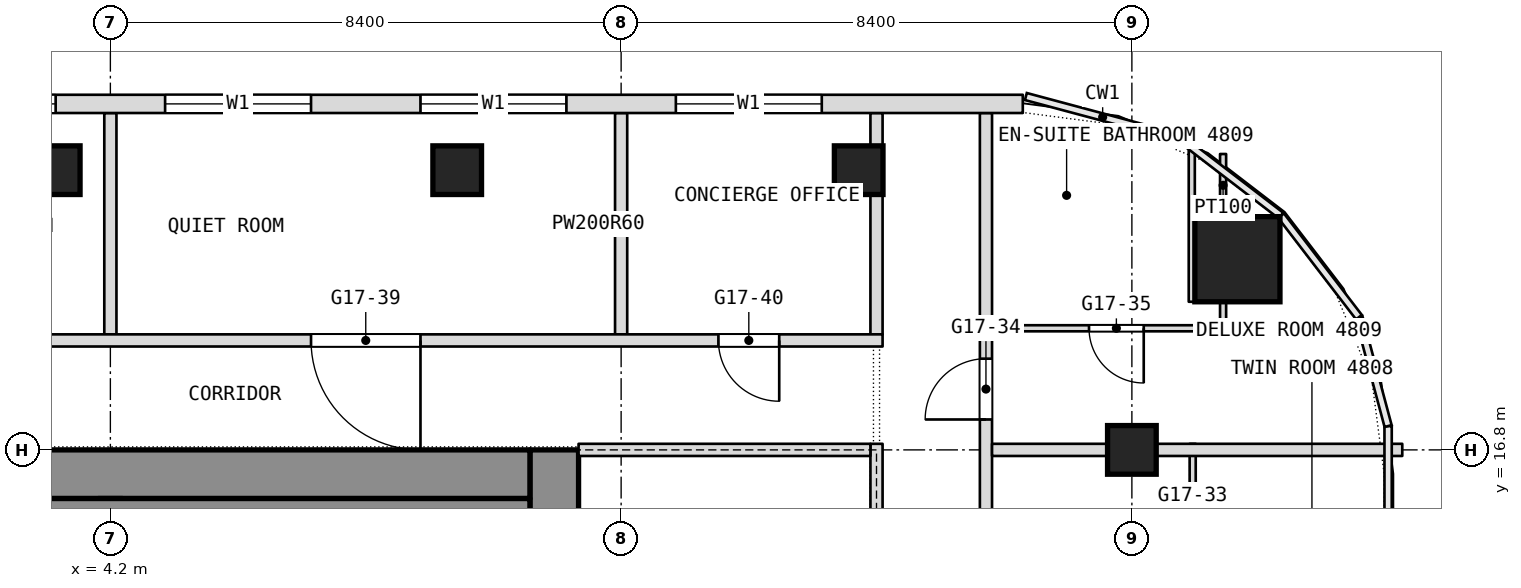
"""IFC4 building model, lengths in metres.
Left out: names, types, materials, properties, quantities, classifications, styles, units other than length and angle.
Written with IfcOpenShell. Run it as: python <this file> out.ifc"""

import sys

from ifc_helpers import new_model, si_unit, direction, frame, frame_2d, origin, origin_2d, place, context, subcontext, project, spatial, rectangle, extrude, element, fill, save


model = new_model("IFC4")
c1 = context("Model", 3, precision=1e-05, world=origin(), true_north=direction((0.0, 1.0)))
c2 = subcontext(c1, "Body", "Model", "MODEL_VIEW")
j1 = project(units=[si_unit("LENGTHUNIT", "METRE"), si_unit("PLANEANGLEUNIT", "RADIAN")], contexts=[c1])
p1 = place(None, origin())
s1 = spatial("IfcSite", under=j1, at=p1, CompositionType="ELEMENT")
p2 = place(p1, origin())
s2 = spatial("IfcBuilding", under=s1, at=p2, CompositionType="ELEMENT")
p3 = place(p2, frame((0.0, 0.0, 209.3)))
s3 = spatial("IfcBuildingStorey", under=s2, at=p3, CompositionType="ELEMENT", Elevation=209.3)
p4 = place(p3, frame((11.5, 0.0, 0.0), z_axis=(0.0, 0.0, 1.0), x_axis=(0.0, 1.0, 0.0)))
e1 = element("IfcWall", 1, at=p4, inside=s3, PredefinedType="SHEAR", context=c2, shape_type="SweptSolid", body=[
    extrude(rectangle(XDim=16.8, YDim=0.8, at=frame_2d((8.4, 0.0))), origin(), (0.0, 0.0, 1.0), 3.6),
])
p5 = place(p4, frame((2.3, 0.0, 0.0)))
e2 = element("IfcOpeningElement", 2, at=p5, cuts=e1, PredefinedType="OPENING", context=c2, shape_type="SweptSolid", body=[
    extrude(rectangle(XDim=1.1, YDim=2.1, at=frame_2d((0.55, 1.05))), frame((0.0, 0.4, 0.0), z_axis=(0.0, -1.0, 0.0), x_axis=(1.0, 0.0, 0.0)), (0.0, 0.0, 1.0), 0.8),
])
p6 = place(p4, frame((4.85, 0.0, 0.0)))
e3 = element("IfcOpeningElement", 3, at=p6, cuts=e1, PredefinedType="OPENING", context=c2, shape_type="SweptSolid", body=[
    extrude(rectangle(XDim=1.1, YDim=2.1, at=frame_2d((0.55, 1.05))), frame((0.0, 0.4, 0.0), z_axis=(0.0, -1.0, 0.0), x_axis=(1.0, 0.0, 0.0)), (0.0, 0.0, 1.0), 0.8),
])
p7 = place(p4, frame((6.825, 0.0, 0.0)))
e4 = element("IfcOpeningElement", 4, at=p7, cuts=e1, PredefinedType="OPENING", context=c2, shape_type="SweptSolid", body=[
    extrude(rectangle(XDim=1.2, YDim=2.1, at=frame_2d((0.6, 1.05))), frame((0.0, 0.4, 0.0), z_axis=(0.0, -1.0, 0.0), x_axis=(1.0, 0.0, 0.0)), (0.0, 0.0, 1.0), 0.8),
])
p8 = place(p4, frame((13.4, 0.0, 0.0)))
e5 = element("IfcOpeningElement", 5, at=p8, cuts=e1, PredefinedType="OPENING", context=c2, shape_type="SweptSolid", body=[
    extrude(rectangle(XDim=1.1, YDim=2.1, at=frame_2d((0.55, 1.05))), frame((0.0, 0.4, 0.0), z_axis=(0.0, -1.0, 0.0), x_axis=(1.0, 0.0, 0.0)), (0.0, 0.0, 1.0), 0.8),
])
p9 = place(p4, frame((10.85, 0.0, 0.0)))
e6 = element("IfcOpeningElement", 6, at=p9, cuts=e1, PredefinedType="OPENING", context=c2, shape_type="SweptSolid", body=[
    extrude(rectangle(XDim=1.1, YDim=2.1, at=frame_2d((0.55, 1.05))), frame((0.0, 0.4, 0.0), z_axis=(0.0, -1.0, 0.0), x_axis=(1.0, 0.0, 0.0)), (0.0, 0.0, 1.0), 0.8),
])
p10 = place(p4, frame((8.775, 0.0, 0.0)))
e7 = element("IfcOpeningElement", 7, at=p10, cuts=e1, PredefinedType="OPENING", context=c2, shape_type="SweptSolid", body=[
    extrude(rectangle(XDim=1.2, YDim=2.1, at=frame_2d((0.6, 1.05))), frame((0.0, 0.4, 0.0), z_axis=(0.0, -1.0, 0.0), x_axis=(1.0, 0.0, 0.0)), (0.0, 0.0, 1.0), 0.8),
])
p11 = place(p3, frame((-11.1, 16.4, 0.0), z_axis=(0.0, 0.0, 1.0), x_axis=(1.0, 0.0, 0.0)))
e8 = element("IfcWall", 8, at=p11, inside=s3, PredefinedType="SHEAR", context=c2, shape_type="SweptSolid", body=[
    extrude(rectangle(XDim=22.2, YDim=0.8, at=frame_2d((11.1, 0.0))), origin(), (0.0, 0.0, 1.0), 3.6),
])
p12 = place(p3, frame((4.2, 0.8, 0.0), z_axis=(0.0, 0.0, 1.0), x_axis=(0.0, 1.0, 0.0)))
e9 = element("IfcWall", 9, at=p12, inside=s3, PredefinedType="SHEAR", context=c2, shape_type="SweptSolid", body=[
    extrude(rectangle(XDim=15.2, YDim=0.4, at=frame_2d((7.6, 0.0))), origin(), (0.0, 0.0, 1.0), 3.6),
])
p13 = place(p12, frame((5.95, 0.0, 0.0)))
e10 = element("IfcOpeningElement", 10, at=p13, cuts=e9, PredefinedType="OPENING", context=c2, shape_type="SweptSolid", body=[
    extrude(rectangle(XDim=1.2, YDim=2.1, at=frame_2d((0.6, 1.05))), frame((0.0, 0.2, 0.0), z_axis=(0.0, -1.0, 0.0), x_axis=(1.0, 0.0, 0.0)), (0.0, 0.0, 1.0), 0.4),
])
p14 = place(p3, frame((22.736, 19.936, 0.0), z_axis=(0.0, 0.0, 1.0), x_axis=(1.0, 0.0, 0.0)))
e11 = element("IfcColumn", 11, at=p14, inside=s3, PredefinedType="COLUMN", context=c2, shape_type="SweptSolid", body=[
    extrude(rectangle(XDim=1.4, YDim=1.4, at=origin_2d()), origin(), (0.0, 0.0, 1.0), 3.6),
])
for number, where, z_axis, x_axis in (
    (12, (21.0, 16.8, 0.0), (0.0, 0.0, 1.0), (1.0, 0.0, 0.0)),
    (13, (3.302, 21.4, 0.0), (0.0, 0.0, 1.0), (1.0, 0.0, 0.0)),
    (14, (9.904, 21.4, 0.0), (0.0, 0.0, 1.0), (1.0, 0.0, 0.0)),
    (15, (16.507, 21.4, 0.0), (0.0, 0.0, 1.0), (1.0, 0.0, 0.0)),
):
    element("IfcColumn", number, at=place(p3, frame(where, z_axis=z_axis, x_axis=x_axis)), inside=s3, PredefinedType="COLUMN", context=c2, shape_type="SweptSolid", body=[
        extrude(rectangle(XDim=0.8, YDim=0.8, at=origin_2d()), origin(), (0.0, 0.0, 1.0), 3.6),
    ])
p15 = place(p3, frame((22.5, 18.85, 0.0), z_axis=(0.0, 0.0, 1.0), x_axis=(0.0, 1.0, 0.0)))
e16 = element("IfcWall", 16, at=p15, inside=s3, PredefinedType="PARTITIONING", context=c2, shape_type="SweptSolid", body=[
    extrude(rectangle(XDim=0.386, YDim=0.1, at=frame_2d((0.193, 0.0))), origin(), (0.0, 0.0, 1.0), 3.34),
])
p16 = place(p3, frame((22.5, 20.636, 0.0), z_axis=(0.0, 0.0, 1.0), x_axis=(0.0, 1.0, 0.0)))
e17 = element("IfcWall", 17, at=p16, inside=s3, PredefinedType="PARTITIONING", context=c2, shape_type="SweptSolid", body=[
    extrude(rectangle(XDim=1.03, YDim=0.1, at=frame_2d((0.515, 0.0))), origin(), (0.0, 0.0, 1.0), 3.34),
])
p17 = place(p3, frame((22.0, 14.45, 0.0), z_axis=(0.0, 0.0, 1.0), x_axis=(0.0, 1.0, 0.0)))
e18 = element("IfcWall", 18, at=p17, inside=s3, PredefinedType="PARTITIONING", context=c2, shape_type="SweptSolid", body=[
    extrude(rectangle(XDim=2.45, YDim=0.1, at=frame_2d((1.225, 0.0))), origin(), (0.0, 0.0, 1.0), 3.34),
])
p18 = place(p17, frame((0.15, 0.0, 0.0)))
e19 = element("IfcOpeningElement", 19, at=p18, cuts=e18, PredefinedType="OPENING", context=c2, shape_type="SweptSolid", body=[
    extrude(rectangle(XDim=0.9, YDim=2.1, at=frame_2d((0.45, 1.05))), frame((0.0, 0.05, 0.0), z_axis=(0.0, -1.0, 0.0), x_axis=(1.0, 0.0, 0.0)), (0.0, 0.0, 1.0), 0.1),
])
p19 = place(p3, frame((18.6, -26.751, 0.0), z_axis=(0.0, 0.0, 1.0), x_axis=(0.0, 1.0, 0.0)))
e20 = element("IfcWall", 20, at=p19, inside=s3, PredefinedType="PARTITIONING", context=c2, shape_type="SweptSolid", body=[
    extrude(rectangle(XDim=49.091, YDim=0.2, at=frame_2d((24.545, 0.0))), origin(), (0.0, 0.0, 1.0), 3.34),
])
p20 = place(p19, frame((3.413, 0.0, 0.0)))
e21 = element("IfcOpeningElement", 21, at=p20, cuts=e20, PredefinedType="OPENING", context=c2, shape_type="SweptSolid", body=[
    extrude(rectangle(XDim=1.0, YDim=2.1, at=frame_2d((0.5, 1.05))), frame((0.0, 0.1, 0.0), z_axis=(0.0, -1.0, 0.0), x_axis=(1.0, 0.0, 0.0)), (0.0, 0.0, 1.0), 0.2),
])
p21 = place(p19, frame((5.838, 0.0, 0.0)))
e22 = element("IfcOpeningElement", 22, at=p21, cuts=e20, PredefinedType="OPENING", context=c2, shape_type="SweptSolid", body=[
    extrude(rectangle(XDim=1.0, YDim=2.1, at=frame_2d((0.5, 1.05))), frame((0.0, 0.1, 0.0), z_axis=(0.0, -1.0, 0.0), x_axis=(1.0, 0.0, 0.0)), (0.0, 0.0, 1.0), 0.2),
])
p22 = place(p19, frame((13.551, 0.0, 0.0)))
e23 = element("IfcOpeningElement", 23, at=p22, cuts=e20, PredefinedType="OPENING", context=c2, shape_type="SweptSolid", body=[
    extrude(rectangle(XDim=1.1, YDim=2.1, at=frame_2d((0.55, 1.05))), frame((0.0, 0.1, 0.0), z_axis=(0.0, -1.0, 0.0), x_axis=(1.0, 0.0, 0.0)), (0.0, 0.0, 1.0), 0.2),
])
p23 = place(p19, frame((21.151, 0.0, 0.0)))
e24 = element("IfcOpeningElement", 24, at=p23, cuts=e20, PredefinedType="OPENING", context=c2, shape_type="SweptSolid", body=[
    extrude(rectangle(XDim=1.0, YDim=2.1, at=frame_2d((0.5, 1.05))), frame((0.0, 0.1, 0.0), z_axis=(0.0, -1.0, 0.0), x_axis=(1.0, 0.0, 0.0)), (0.0, 0.0, 1.0), 0.2),
])
p24 = place(p19, frame((22.951, 0.0, 0.0)))
e25 = element("IfcOpeningElement", 25, at=p24, cuts=e20, PredefinedType="OPENING", context=c2, shape_type="SweptSolid", body=[
    extrude(rectangle(XDim=1.0, YDim=2.1, at=frame_2d((0.5, 1.05))), frame((0.0, 0.1, 0.0), z_axis=(0.0, -1.0, 0.0), x_axis=(1.0, 0.0, 0.0)), (0.0, 0.0, 1.0), 0.2),
])
p25 = place(p19, frame((30.351, 0.0, 0.0)))
e26 = element("IfcOpeningElement", 26, at=p25, cuts=e20, PredefinedType="OPENING", context=c2, shape_type="SweptSolid", body=[
    extrude(rectangle(XDim=1.1, YDim=2.1, at=frame_2d((0.55, 1.05))), frame((0.0, 0.1, 0.0), z_axis=(0.0, -1.0, 0.0), x_axis=(1.0, 0.0, 0.0)), (0.0, 0.0, 1.0), 0.2),
])
p26 = place(p19, frame((37.951, 0.0, 0.0)))
e27 = element("IfcOpeningElement", 27, at=p26, cuts=e20, PredefinedType="OPENING", context=c2, shape_type="SweptSolid", body=[
    extrude(rectangle(XDim=1.0, YDim=2.1, at=frame_2d((0.5, 1.05))), frame((0.0, 0.1, 0.0), z_axis=(0.0, -1.0, 0.0), x_axis=(1.0, 0.0, 0.0)), (0.0, 0.0, 1.0), 0.2),
])
p27 = place(p19, frame((39.751, 0.0, 0.0)))
e28 = element("IfcOpeningElement", 28, at=p27, cuts=e20, PredefinedType="OPENING", context=c2, shape_type="SweptSolid", body=[
    extrude(rectangle(XDim=1.0, YDim=2.1, at=frame_2d((0.5, 1.05))), frame((0.0, 0.1, 0.0), z_axis=(0.0, -1.0, 0.0), x_axis=(1.0, 0.0, 0.0)), (0.0, 0.0, 1.0), 0.2),
])
p28 = place(p19, frame((44.051, 0.0, 0.0)))
e29 = element("IfcOpeningElement", 29, at=p28, cuts=e20, PredefinedType="OPENING", context=c2, shape_type="SweptSolid", body=[
    extrude(rectangle(XDim=1.0, YDim=2.1, at=frame_2d((0.5, 1.05))), frame((0.0, 0.1, 0.0), z_axis=(0.0, -1.0, 0.0), x_axis=(1.0, 0.0, 0.0)), (0.0, 0.0, 1.0), 0.2),
])
for number, where, z_axis, x_axis in (
    (30, (16.8, 18.7, 0.0), (0.0, 0.0, 1.0), (0.0, 1.0, 0.0)),
    (31, (12.6, 18.7, 0.0), (0.0, 0.0, 1.0), (0.0, 1.0, 0.0)),
    (32, (4.2, 18.7, 0.0), (0.0, 0.0, 1.0), (0.0, 1.0, 0.0)),
):
    element("IfcWall", number, at=place(p3, frame(where, z_axis=z_axis, x_axis=x_axis)), inside=s3, PredefinedType="PARTITIONING", context=c2, shape_type="SweptSolid", body=[
        extrude(rectangle(XDim=3.64, YDim=0.2, at=frame_2d((1.82, 0.0))), origin(), (0.0, 0.0, 1.0), 3.34),
    ])
p29 = place(p3, frame((18.7, 16.8, 0.0), z_axis=(0.0, 0.0, 1.0), x_axis=(1.0, 0.0, 0.0)))
e33 = element("IfcWall", 33, at=p29, inside=s3, PredefinedType="PARTITIONING", context=c2, shape_type="SweptSolid", body=[
    extrude(rectangle(XDim=6.747, YDim=0.2, at=frame_2d((3.374, 0.0))), origin(), (0.0, 0.0, 1.0), 2.94),
])
p30 = place(p3, frame((-16.9, 18.6, 0.0), z_axis=(0.0, 0.0, 1.0), x_axis=(1.0, 0.0, 0.0)))
e34 = element("IfcWall", 34, at=p30, inside=s3, PredefinedType="PARTITIONING", context=c2, shape_type="SweptSolid", body=[
    extrude(rectangle(XDim=33.8, YDim=0.2, at=frame_2d((16.9, 0.0))), origin(), (0.0, 0.0, 1.0), 3.34),
])
p31 = place(p30, frame((1.7, 0.0, 0.0)))
e35 = element("IfcOpeningElement", 35, at=p31, cuts=e34, PredefinedType="OPENING", context=c2, shape_type="SweptSolid", body=[
    extrude(rectangle(XDim=1.0, YDim=2.1, at=frame_2d((0.5, 1.05))), frame((0.0, 0.1, 0.0), z_axis=(0.0, -1.0, 0.0), x_axis=(1.0, 0.0, 0.0)), (0.0, 0.0, 1.0), 0.2),
])
p32 = place(p30, frame((7.6, 0.0, 0.0)))
e36 = element("IfcOpeningElement", 36, at=p32, cuts=e34, PredefinedType="OPENING", context=c2, shape_type="SweptSolid", body=[
    extrude(rectangle(XDim=1.8, YDim=2.1, at=frame_2d((0.9, 1.05))), frame((0.0, 0.1, 0.0), z_axis=(0.0, -1.0, 0.0), x_axis=(1.0, 0.0, 0.0)), (0.0, 0.0, 1.0), 0.2),
])
p33 = place(p30, frame((16.0, 0.0, 0.0)))
e37 = element("IfcOpeningElement", 37, at=p33, cuts=e34, PredefinedType="OPENING", context=c2, shape_type="SweptSolid", body=[
    extrude(rectangle(XDim=1.8, YDim=2.1, at=frame_2d((0.9, 1.05))), frame((0.0, 0.1, 0.0), z_axis=(0.0, -1.0, 0.0), x_axis=(1.0, 0.0, 0.0)), (0.0, 0.0, 1.0), 0.2),
])
p34 = place(p30, frame((24.4, 0.0, 0.0)))
e38 = element("IfcOpeningElement", 38, at=p34, cuts=e34, PredefinedType="OPENING", context=c2, shape_type="SweptSolid", body=[
    extrude(rectangle(XDim=1.8, YDim=2.1, at=frame_2d((0.9, 1.05))), frame((0.0, 0.1, 0.0), z_axis=(0.0, -1.0, 0.0), x_axis=(1.0, 0.0, 0.0)), (0.0, 0.0, 1.0), 0.2),
])
p35 = place(p30, frame((31.1, 0.0, 0.0)))
e39 = element("IfcOpeningElement", 39, at=p35, cuts=e34, PredefinedType="OPENING", context=c2, shape_type="SweptSolid", body=[
    extrude(rectangle(XDim=1.0, YDim=2.1, at=frame_2d((0.5, 1.05))), frame((0.0, 0.1, 0.0), z_axis=(0.0, -1.0, 0.0), x_axis=(1.0, 0.0, 0.0)), (0.0, 0.0, 1.0), 0.2),
])
p36 = place(p3, frame((18.7, 18.8, 0.0), z_axis=(0.0, 0.0, 1.0), x_axis=(1.0, 0.0, 0.0)))
e40 = element("IfcWall", 40, at=p36, inside=s3, PredefinedType="PARTITIONING", context=c2, shape_type="SweptSolid", body=[
    extrude(rectangle(XDim=3.85, YDim=0.1, at=frame_2d((1.925, 0.0))), origin(), (0.0, 0.0, 1.0), 3.34),
])
p37 = place(p36, frame((1.595, 0.0, 0.0)))
e41 = element("IfcOpeningElement", 41, at=p37, cuts=e40, PredefinedType="OPENING", context=c2, shape_type="SweptSolid", body=[
    extrude(rectangle(XDim=0.9, YDim=2.1, at=frame_2d((0.45, 1.05))), frame((0.0, 0.05, 0.0), z_axis=(0.0, -1.0, 0.0), x_axis=(1.0, 0.0, 0.0)), (0.0, 0.0, 1.0), 0.1),
])
p38 = place(p3, frame((21.985, 19.236, 0.0), z_axis=(0.0, 0.0, 1.0), x_axis=(0.0, 1.0, 0.0)))
e42 = element("IfcWall", 42, at=p38, inside=s3, PredefinedType="PARTITIONING", context=c2, shape_type="SweptSolid", body=[
    extrude(rectangle(XDim=2.513, YDim=0.1, at=frame_2d((1.256, 0.0))), origin(), (0.0, 0.0, 1.0), 3.34),
])
p39 = place(p3, frame((19.206, 22.49, 0.0), z_axis=(0.0, 0.0, 1.0), x_axis=(-1.0, 0.0, 0.0)))
e43 = element("IfcWall", 43, at=p39, inside=s3, PredefinedType="NOTDEFINED", context=c2, shape_type="SweptSolid", body=[
    extrude(rectangle(XDim=38.412, YDim=0.3, at=frame_2d((19.206, 0.0))), origin(), (0.0, 0.0, 1.0), 3.6),
])
p40 = place(p39, frame((3.306, 0.0, 0.9)))
e44 = element("IfcOpeningElement", 44, at=p40, cuts=e43, PredefinedType="OPENING", context=c2, shape_type="SweptSolid", body=[
    extrude(rectangle(XDim=2.4, YDim=2.1, at=frame_2d((1.2, 1.05))), frame((0.0, 0.15, 0.0), z_axis=(0.0, -1.0, 0.0), x_axis=(1.0, 0.0, 0.0)), (0.0, 0.0, 1.0), 0.3),
])
p41 = place(p39, frame((7.506, 0.0, 0.9)))
e45 = element("IfcOpeningElement", 45, at=p41, cuts=e43, PredefinedType="OPENING", context=c2, shape_type="SweptSolid", body=[
    extrude(rectangle(XDim=2.4, YDim=2.1, at=frame_2d((1.2, 1.05))), frame((0.0, 0.15, 0.0), z_axis=(0.0, -1.0, 0.0), x_axis=(1.0, 0.0, 0.0)), (0.0, 0.0, 1.0), 0.3),
])
p42 = place(p39, frame((11.706, 0.0, 0.9)))
e46 = element("IfcOpeningElement", 46, at=p42, cuts=e43, PredefinedType="OPENING", context=c2, shape_type="SweptSolid", body=[
    extrude(rectangle(XDim=2.4, YDim=2.1, at=frame_2d((1.2, 1.05))), frame((0.0, 0.15, 0.0), z_axis=(0.0, -1.0, 0.0), x_axis=(1.0, 0.0, 0.0)), (0.0, 0.0, 1.0), 0.3),
])
p43 = place(p39, frame((15.906, 0.0, 0.9)))
e47 = element("IfcOpeningElement", 47, at=p43, cuts=e43, PredefinedType="OPENING", context=c2, shape_type="SweptSolid", body=[
    extrude(rectangle(XDim=2.4, YDim=2.1, at=frame_2d((1.2, 1.05))), frame((0.0, 0.15, 0.0), z_axis=(0.0, -1.0, 0.0), x_axis=(1.0, 0.0, 0.0)), (0.0, 0.0, 1.0), 0.3),
])
p44 = place(p39, frame((20.106, 0.0, 0.9)))
e48 = element("IfcOpeningElement", 48, at=p44, cuts=e43, PredefinedType="OPENING", context=c2, shape_type="SweptSolid", body=[
    extrude(rectangle(XDim=2.4, YDim=2.1, at=frame_2d((1.2, 1.05))), frame((0.0, 0.15, 0.0), z_axis=(0.0, -1.0, 0.0), x_axis=(1.0, 0.0, 0.0)), (0.0, 0.0, 1.0), 0.3),
])
p45 = place(p39, frame((24.306, 0.0, 0.9)))
e49 = element("IfcOpeningElement", 49, at=p45, cuts=e43, PredefinedType="OPENING", context=c2, shape_type="SweptSolid", body=[
    extrude(rectangle(XDim=2.4, YDim=2.1, at=frame_2d((1.2, 1.05))), frame((0.0, 0.15, 0.0), z_axis=(0.0, -1.0, 0.0), x_axis=(1.0, 0.0, 0.0)), (0.0, 0.0, 1.0), 0.3),
])
p46 = place(p39, frame((28.506, 0.0, 0.9)))
e50 = element("IfcOpeningElement", 50, at=p46, cuts=e43, PredefinedType="OPENING", context=c2, shape_type="SweptSolid", body=[
    extrude(rectangle(XDim=2.4, YDim=2.1, at=frame_2d((1.2, 1.05))), frame((0.0, 0.15, 0.0), z_axis=(0.0, -1.0, 0.0), x_axis=(1.0, 0.0, 0.0)), (0.0, 0.0, 1.0), 0.3),
])
p47 = place(p39, frame((32.706, 0.0, 0.9)))
e51 = element("IfcOpeningElement", 51, at=p47, cuts=e43, PredefinedType="OPENING", context=c2, shape_type="SweptSolid", body=[
    extrude(rectangle(XDim=2.4, YDim=2.1, at=frame_2d((1.2, 1.05))), frame((0.0, 0.15, 0.0), z_axis=(0.0, -1.0, 0.0), x_axis=(1.0, 0.0, 0.0)), (0.0, 0.0, 1.0), 0.3),
])
p48 = place(p3, frame((-11.1, 15.65, 0.0), z_axis=(0.0, 0.0, 1.0), x_axis=(1.0, 0.0, 0.0)))
e52 = element("IfcWall", 52, at=p48, inside=s3, PredefinedType="PARTITIONING", context=c2, shape_type="SweptSolid", body=[
    extrude(rectangle(XDim=22.2, YDim=0.7, at=frame_2d((11.1, 0.0))), origin(), (0.0, 0.0, 1.0), 3.34),
])
p49 = place(p3, frame((16.8, -0.1, 0.0), z_axis=(0.0, 0.0, 1.0), x_axis=(0.0, 1.0, 0.0)))
e53 = element("IfcWall", 53, at=p49, inside=s3, PredefinedType="PARTITIONING", context=c2, shape_type="SweptSolid", body=[
    extrude(rectangle(XDim=17.0, YDim=0.2, at=frame_2d((8.5, 0.0))), origin(), (0.0, 0.0, 1.0), 3.34),
])
p50 = place(p49, frame((2.2, 0.0, 0.0)))
e54 = element("IfcOpeningElement", 54, at=p50, cuts=e53, PredefinedType="OPENING", context=c2, shape_type="SweptSolid", body=[
    extrude(rectangle(XDim=1.8, YDim=2.1, at=frame_2d((0.9, 1.05))), frame((0.0, 0.1, 0.0), z_axis=(0.0, -1.0, 0.0), x_axis=(1.0, 0.0, 0.0)), (0.0, 0.0, 1.0), 0.2),
])
p51 = place(p49, frame((13.0, 0.0, 0.0)))
e55 = element("IfcOpeningElement", 55, at=p51, cuts=e53, PredefinedType="OPENING", context=c2, shape_type="SweptSolid", body=[
    extrude(rectangle(XDim=1.8, YDim=2.1, at=frame_2d((0.9, 1.05))), frame((0.0, 0.1, 0.0), z_axis=(0.0, -1.0, 0.0), x_axis=(1.0, 0.0, 0.0)), (0.0, 0.0, 1.0), 0.2),
])
p52 = place(p3, frame((11.9, 16.8, 0.0), z_axis=(0.0, 0.0, 1.0), x_axis=(1.0, 0.0, 0.0)))
e56 = element("IfcWall", 56, at=p52, inside=s3, PredefinedType="PARTITIONING", context=c2, shape_type="SweptSolid", body=[
    extrude(rectangle(XDim=4.8, YDim=0.2, at=frame_2d((2.4, 0.0))), origin(), (0.0, 0.0, 1.0), 2.94),
])
p53 = place(p28, origin())
e57 = element("IfcDoor", 57, at=p53, inside=s3, OperationType="SINGLE_SWING_RIGHT", PredefinedType="DOOR", context=c2, shape_type="SweptSolid", body=[
    extrude(rectangle(XDim=1.0, YDim=2.1, at=frame_2d((0.5, 1.05))), frame((0.0, 0.025, 0.0), z_axis=(0.0, -1.0, 0.0), x_axis=(1.0, 0.0, 0.0)), (0.0, 0.0, 1.0), 0.05),
])
fill(e29, e57)
p54 = place(p34, origin())
e58 = element("IfcDoor", 58, at=p54, inside=s3, OperationType="DOUBLE_DOOR_SINGLE_SWING", PredefinedType="DOOR", context=c2, shape_type="SweptSolid", body=[
    extrude(rectangle(XDim=1.8, YDim=2.1, at=frame_2d((0.9, 1.05))), frame((0.0, 0.025, 0.0), z_axis=(0.0, -1.0, 0.0), x_axis=(1.0, 0.0, 0.0)), (0.0, 0.0, 1.0), 0.05),
])
fill(e38, e58)
p55 = place(p35, origin())
e59 = element("IfcDoor", 59, at=p55, inside=s3, OperationType="SINGLE_SWING_RIGHT", PredefinedType="DOOR", context=c2, shape_type="SweptSolid", body=[
    extrude(rectangle(XDim=1.0, YDim=2.1, at=frame_2d((0.5, 1.05))), frame((0.0, 0.025, 0.0), z_axis=(0.0, -1.0, 0.0), x_axis=(1.0, 0.0, 0.0)), (0.0, 0.0, 1.0), 0.05),
])
fill(e39, e59)
p56 = place(p37, origin())
e60 = element("IfcDoor", 60, at=p56, inside=s3, OperationType="SINGLE_SWING_RIGHT", PredefinedType="DOOR", context=c2, shape_type="SweptSolid", body=[
    extrude(rectangle(XDim=0.9, YDim=2.1, at=frame_2d((0.45, 1.05))), frame((0.0, 0.025, 0.0), z_axis=(0.0, -1.0, 0.0), x_axis=(1.0, 0.0, 0.0)), (0.0, 0.0, 1.0), 0.05),
])
fill(e41, e60)
p57 = place(p40, origin())
e61 = element("IfcWindow", 61, at=p57, inside=s3, PartitioningType="SINGLE_PANEL", PredefinedType="WINDOW", context=c2, shape_type="SweptSolid", body=[
    extrude(rectangle(XDim=2.4, YDim=2.1, at=frame_2d((1.2, 1.05))), frame((0.0, 0.03, 0.0), z_axis=(0.0, -1.0, 0.0), x_axis=(1.0, 0.0, 0.0)), (0.0, 0.0, 1.0), 0.06),
])
fill(e44, e61)
p58 = place(p41, origin())
e62 = element("IfcWindow", 62, at=p58, inside=s3, PartitioningType="SINGLE_PANEL", PredefinedType="WINDOW", context=c2, shape_type="SweptSolid", body=[
    extrude(rectangle(XDim=2.4, YDim=2.1, at=frame_2d((1.2, 1.05))), frame((0.0, 0.03, 0.0), z_axis=(0.0, -1.0, 0.0), x_axis=(1.0, 0.0, 0.0)), (0.0, 0.0, 1.0), 0.06),
])
fill(e45, e62)
p59 = place(p42, origin())
e63 = element("IfcWindow", 63, at=p59, inside=s3, PartitioningType="SINGLE_PANEL", PredefinedType="WINDOW", context=c2, shape_type="SweptSolid", body=[
    extrude(rectangle(XDim=2.4, YDim=2.1, at=frame_2d((1.2, 1.05))), frame((0.0, 0.03, 0.0), z_axis=(0.0, -1.0, 0.0), x_axis=(1.0, 0.0, 0.0)), (0.0, 0.0, 1.0), 0.06),
])
fill(e46, e63)
p60 = place(p43, origin())
e64 = element("IfcWindow", 64, at=p60, inside=s3, PartitioningType="SINGLE_PANEL", PredefinedType="WINDOW", context=c2, shape_type="SweptSolid", body=[
    extrude(rectangle(XDim=2.4, YDim=2.1, at=frame_2d((1.2, 1.05))), frame((0.0, 0.03, 0.0), z_axis=(0.0, -1.0, 0.0), x_axis=(1.0, 0.0, 0.0)), (0.0, 0.0, 1.0), 0.06),
])
fill(e47, e64)
save(model, sys.argv[1])
